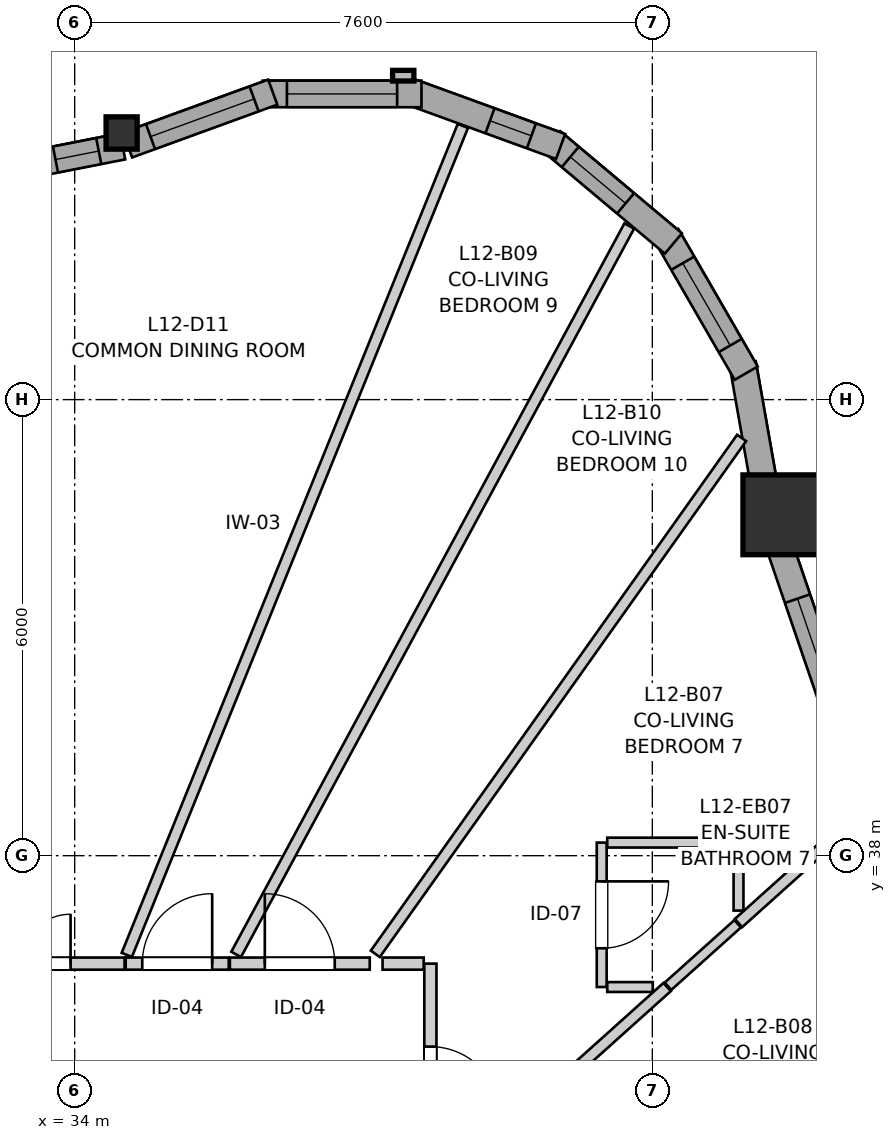
"""IFC4 building model, lengths in metres.
Left out: names, types, materials, properties, quantities, classifications, styles, units other than length and angle.
Written with IfcOpenShell. Run it as: python <this file> out.ifc"""

import sys

from ifc_helpers import new_model, si_unit, direction, frame, frame_2d, origin, origin_2d, place, context, subcontext, project, spatial, rectangle, i_section, extrude, source, transform, mapped, element, fill, save


model = new_model("IFC4")
c1 = context("Model", 3, precision=1e-05, world=origin(), true_north=direction((0.0, 1.0)))
c2 = subcontext(c1, "Body", "Model", "MODEL_VIEW")
j1 = project(units=[si_unit("LENGTHUNIT", "METRE"), si_unit("PLANEANGLEUNIT", "RADIAN")], contexts=[c1])
p1 = place(None, origin())
s1 = spatial("IfcSite", under=j1, at=p1, CompositionType="ELEMENT")
p2 = place(p1, origin())
s2 = spatial("IfcBuilding", under=s1, at=p2, CompositionType="ELEMENT")
p3 = place(p2, frame((0.0, 0.0, 43.0)))
s3 = spatial("IfcBuildingStorey", under=s2, at=p3, CompositionType="ELEMENT", Elevation=43.0)
m1 = source(origin(), c2, "Body", "SweptSolid", [
    extrude(rectangle(XDim=1.05, YDim=1.05, at=origin_2d()), origin(), (0.0, 0.0, 1.0), 2.94),
])
p4 = place(p3, frame((43.317, 42.485, 0.0), z_axis=(0.0, 0.0, 1.0), x_axis=(1.0, 0.0, 0.0)))
e1 = element("IfcColumn", 1, at=p4, inside=s3, PredefinedType="COLUMN", context=c2, shape_type="MappedRepresentation", body=[
    mapped(m1, transform((0.0, 0.0, 0.0), x_axis=(1.0, 0.0, 0.0), y_axis=(0.0, 1.0, 0.0), z_axis=(0.0, 0.0, 1.0), scale=1.0)),
])
m2 = source(origin(), c2, "Body", "SweptSolid", [
    extrude(i_section(OverallWidth=0.409, OverallDepth=0.425, WebThickness=0.03, FlangeThickness=0.048, FilletRadius=0.015, at=origin_2d()), origin(), (0.0, 0.0, 1.0), 2.94),
])
p5 = place(p3, frame((34.617, 47.508, 0.0), z_axis=(0.0, 0.0, 1.0), x_axis=(1.0, 0.0, 0.0)))
e2 = element("IfcColumn", 2, at=p5, inside=s3, PredefinedType="PILASTER", context=c2, shape_type="MappedRepresentation", body=[
    mapped(m2, transform((0.0, 0.0, 0.0), x_axis=(1.0, 0.0, 0.0), y_axis=(0.0, 1.0, 0.0), z_axis=(0.0, 0.0, 1.0), scale=1.0)),
])
p6 = place(p3, frame((44.292, 39.095, 0.0), z_axis=(0.0, 0.0, 1.0), x_axis=(-0.323582370233, 0.946200005112, 0.0)))
e3 = element("IfcWall", 3, at=p6, inside=s3, PredefinedType="SOLIDWALL", context=c2, shape_type="SweptSolid", body=[
    extrude(rectangle(XDim=3.222, YDim=0.35, at=frame_2d((1.611, 0.0))), origin(), (0.0, 0.0, 1.0), 2.42),
])
p7 = place(p6, frame((0.816, 0.0, 0.82)))
e4 = element("IfcOpeningElement", 4, at=p7, cuts=e3, PredefinedType="OPENING", context=c2, shape_type="SweptSolid", body=[
    extrude(rectangle(XDim=1.6, YDim=1.35, at=frame_2d((0.8, 0.675))), frame((0.0, 0.185, 0.0), z_axis=(0.0, -1.0, 0.0), x_axis=(1.0, 0.0, 0.0)), (0.0, 0.0, 1.0), 0.37),
])
p8 = place(p3, frame((43.093, 42.75, 0.0), z_axis=(0.0, 0.0, 1.0), x_axis=(-0.173610462023, 0.984814402553, 0.0)))
e5 = element("IfcWall", 5, at=p8, inside=s3, PredefinedType="SOLIDWALL", context=c2, shape_type="SweptSolid", body=[
    extrude(rectangle(XDim=1.752, YDim=0.35, at=frame_2d((0.876, 0.0))), origin(), (0.0, 0.0, 1.0), 2.42),
])
p9 = place(p3, frame((42.835, 44.348, 0.0), z_axis=(0.0, 0.0, 1.0), x_axis=(-0.499995423472, 0.866028046028, 0.0)))
e6 = element("IfcWall", 6, at=p9, inside=s3, PredefinedType="SOLIDWALL", context=c2, shape_type="SweptSolid", body=[
    extrude(rectangle(XDim=2.09, YDim=0.35, at=frame_2d((1.045, 0.0))), origin(), (0.0, 0.0, 1.0), 2.42),
])
p10 = place(p9, frame((0.42, 0.0, 0.82)))
e7 = element("IfcOpeningElement", 7, at=p10, cuts=e6, PredefinedType="OPENING", context=c2, shape_type="SweptSolid", body=[
    extrude(rectangle(XDim=1.25, YDim=1.35, at=frame_2d((0.625, 0.675))), frame((0.0, 0.185, 0.0), z_axis=(0.0, -1.0, 0.0), x_axis=(1.0, 0.0, 0.0)), (0.0, 0.0, 1.0), 0.37),
])
p11 = place(p3, frame((41.877, 46.054, 0.0), z_axis=(0.0, 0.0, 1.0), x_axis=(-0.766024572719, 0.642811289563, 0.0)))
e8 = element("IfcWall", 8, at=p11, inside=s3, PredefinedType="SOLIDWALL", context=c2, shape_type="SweptSolid", body=[
    extrude(rectangle(XDim=2.09, YDim=0.35, at=frame_2d((1.045, 0.0))), origin(), (0.0, 0.0, 1.0), 2.42),
])
p12 = place(p11, frame((0.821, 0.0, 0.82)))
e9 = element("IfcOpeningElement", 9, at=p12, cuts=e8, PredefinedType="OPENING", context=c2, shape_type="SweptSolid", body=[
    extrude(rectangle(XDim=0.95, YDim=1.35, at=frame_2d((0.475, 0.675))), frame((0.0, 0.185, 0.0), z_axis=(0.0, -1.0, 0.0), x_axis=(1.0, 0.0, 0.0)), (0.0, 0.0, 1.0), 0.37),
])
p13 = place(p3, frame((40.393, 47.33, 0.0), z_axis=(0.0, 0.0, 1.0), x_axis=(-0.939660353162, 0.342108784886, 0.0)))
e10 = element("IfcWall", 10, at=p13, inside=s3, PredefinedType="SOLIDWALL", context=c2, shape_type="SweptSolid", body=[
    extrude(rectangle(XDim=2.09, YDim=0.35, at=frame_2d((1.045, 0.0))), origin(), (0.0, 0.0, 1.0), 2.42),
])
p14 = place(p13, frame((0.409, 0.0, 0.82)))
e11 = element("IfcOpeningElement", 11, at=p14, cuts=e10, PredefinedType="OPENING", context=c2, shape_type="SweptSolid", body=[
    extrude(rectangle(XDim=0.58, YDim=1.35, at=frame_2d((0.29, 0.675))), frame((0.0, 0.185, 0.0), z_axis=(0.0, -1.0, 0.0), x_axis=(1.0, 0.0, 0.0)), (0.0, 0.0, 1.0), 0.37),
])
p15 = place(p3, frame((38.563, 48.022, 0.0), z_axis=(0.0, 0.0, 1.0), x_axis=(-1.0, 0.0, 0.0)))
e12 = element("IfcWall", 12, at=p15, inside=s3, PredefinedType="SOLIDWALL", context=c2, shape_type="SweptSolid", body=[
    extrude(rectangle(XDim=2.09, YDim=0.35, at=frame_2d((1.045, 0.0))), origin(), (0.0, 0.0, 1.0), 2.42),
])
p16 = place(p15, frame((0.32, 0.0, 0.82)))
e13 = element("IfcOpeningElement", 13, at=p16, cuts=e12, PredefinedType="OPENING", context=c2, shape_type="SweptSolid", body=[
    extrude(rectangle(XDim=1.45, YDim=1.25, at=frame_2d((0.725, 0.625))), frame((0.0, 0.185, 0.0), z_axis=(0.0, -1.0, 0.0), x_axis=(1.0, 0.0, 0.0)), (0.0, 0.0, 1.0), 0.37),
])
p17 = place(p3, frame((36.606, 48.045, 0.0), z_axis=(0.0, 0.0, 1.0), x_axis=(-0.939653047052, -0.342128851701, 0.0)))
e14 = element("IfcWall", 14, at=p17, inside=s3, PredefinedType="SOLIDWALL", context=c2, shape_type="SweptSolid", body=[
    extrude(rectangle(XDim=2.032, YDim=0.35, at=frame_2d((1.016, 0.0))), origin(), (0.0, 0.0, 1.0), 2.42),
])
p18 = place(p17, frame((0.261, 0.0, 0.82)))
e15 = element("IfcOpeningElement", 15, at=p18, cuts=e14, PredefinedType="OPENING", context=c2, shape_type="SweptSolid", body=[
    extrude(rectangle(XDim=1.45, YDim=1.25, at=frame_2d((0.725, 0.625))), frame((0.0, 0.185, 0.0), z_axis=(0.0, -1.0, 0.0), x_axis=(1.0, 0.0, 0.0)), (0.0, 0.0, 1.0), 0.37),
])
p19 = place(p3, frame((34.632, 47.332, 0.0), z_axis=(0.0, 0.0, 1.0), x_axis=(-0.981234691866, -0.192817217796, 0.0)))
e16 = element("IfcWall", 16, at=p19, inside=s3, PredefinedType="SOLIDWALL", context=c2, shape_type="SweptSolid", body=[
    extrude(rectangle(XDim=3.502, YDim=0.35, at=frame_2d((1.751, 0.0))), origin(), (0.0, 0.0, 1.0), 2.42),
])
p20 = place(p19, frame((0.321, 0.0, 0.82)))
e17 = element("IfcOpeningElement", 17, at=p20, cuts=e16, PredefinedType="OPENING", context=c2, shape_type="SweptSolid", body=[
    extrude(rectangle(XDim=0.58, YDim=1.35, at=frame_2d((0.29, 0.675))), frame((0.0, 0.185, 0.0), z_axis=(0.0, -1.0, 0.0), x_axis=(1.0, 0.0, 0.0)), (0.0, 0.0, 1.0), 0.37),
])
p21 = place(p19, frame((1.567, 0.0, 0.82)))
e18 = element("IfcOpeningElement", 18, at=p21, cuts=e16, PredefinedType="OPENING", context=c2, shape_type="SweptSolid", body=[
    extrude(rectangle(XDim=1.45, YDim=1.25, at=frame_2d((0.725, 0.625))), frame((0.0, 0.185, 0.0), z_axis=(0.0, -1.0, 0.0), x_axis=(1.0, 0.0, 0.0)), (0.0, 0.0, 1.0), 0.37),
])
p22 = place(p3, frame((38.68, 36.58, 0.0), z_axis=(0.0, 0.0, 1.0), x_axis=(0.0, -1.0, 0.0)))
e19 = element("IfcWall", 19, at=p22, inside=s3, PredefinedType="PARTITIONING", context=c2, shape_type="SweptSolid", body=[
    extrude(rectangle(XDim=3.069, YDim=0.16, at=frame_2d((1.535, 0.0))), origin(), (0.0, 0.0, 1.0), 2.94),
])
p23 = place(p22, frame((1.092, 0.0, 0.0)))
e20 = element("IfcOpeningElement", 20, at=p23, cuts=e19, PredefinedType="OPENING", context=c2, shape_type="SweptSolid", body=[
    extrude(rectangle(XDim=0.92, YDim=2.1, at=frame_2d((0.46, 1.05))), frame((0.0, 0.09, 0.0), z_axis=(0.0, -1.0, 0.0), x_axis=(1.0, 0.0, 0.0)), (0.0, 0.0, 1.0), 0.18),
])
p24 = place(p3, frame((31.938, 36.58, 0.0), z_axis=(0.0, 0.0, 1.0), x_axis=(1.0, 0.0, 0.0)))
e21 = element("IfcWall", 21, at=p24, inside=s3, PredefinedType="PARTITIONING", context=c2, shape_type="SweptSolid", body=[
    extrude(rectangle(XDim=2.718, YDim=0.16, at=frame_2d((1.359, 0.0))), origin(), (0.0, 0.0, 1.0), 2.94),
])
p25 = place(p24, frame((0.708, 0.0, 0.0)))
e22 = element("IfcOpeningElement", 22, at=p25, cuts=e21, PredefinedType="OPENING", context=c2, shape_type="SweptSolid", body=[
    extrude(rectangle(XDim=1.3, YDim=2.1, at=frame_2d((0.65, 1.05))), frame((0.0, 0.09, 0.0), z_axis=(0.0, -1.0, 0.0), x_axis=(1.0, 0.0, 0.0)), (0.0, 0.0, 1.0), 0.18),
])
p26 = place(p3, frame((40.934, 38.172, 0.0), z_axis=(0.0, 0.0, 1.0), x_axis=(0.0, -1.0, 0.0)))
e23 = element("IfcWall", 23, at=p26, inside=s3, PredefinedType="PARTITIONING", context=c2, shape_type="SweptSolid", body=[
    extrude(rectangle(XDim=1.9, YDim=0.13, at=frame_2d((0.95, 0.0))), origin(), (0.0, 0.0, 1.0), 2.94),
])
p27 = place(p26, frame((0.51, 0.0, 0.0)))
e24 = element("IfcOpeningElement", 24, at=p27, cuts=e23, PredefinedType="OPENING", context=c2, shape_type="SweptSolid", body=[
    extrude(rectangle(XDim=0.88, YDim=2.05, at=frame_2d((0.44, 1.025))), frame((0.0, 0.075, 0.0), z_axis=(0.0, -1.0, 0.0), x_axis=(1.0, 0.0, 0.0)), (0.0, 0.0, 1.0), 0.15),
])
p28 = place(p3, frame((36.042, 36.58, 0.0), z_axis=(0.0, 0.0, 1.0), x_axis=(1.0, 0.0, 0.0)))
e25 = element("IfcWall", 25, at=p28, inside=s3, PredefinedType="PARTITIONING", context=c2, shape_type="SweptSolid", body=[
    extrude(rectangle(XDim=1.84, YDim=0.16, at=frame_2d((0.92, 0.0))), origin(), (0.0, 0.0, 1.0), 2.94),
])
p29 = place(p28, frame((0.459, 0.0, 0.0)))
e26 = element("IfcOpeningElement", 26, at=p29, cuts=e25, PredefinedType="OPENING", context=c2, shape_type="SweptSolid", body=[
    extrude(rectangle(XDim=0.92, YDim=2.1, at=frame_2d((0.46, 1.05))), frame((0.0, 0.09, 0.0), z_axis=(0.0, -1.0, 0.0), x_axis=(1.0, 0.0, 0.0)), (0.0, 0.0, 1.0), 0.18),
])
p30 = place(p3, frame((34.671, 36.58, 0.0), z_axis=(0.0, 0.0, 1.0), x_axis=(1.0, 0.0, 0.0)))
e27 = element("IfcWall", 27, at=p30, inside=s3, PredefinedType="PARTITIONING", context=c2, shape_type="SweptSolid", body=[
    extrude(rectangle(XDim=1.356, YDim=0.16, at=frame_2d((0.678, 0.0))), origin(), (0.0, 0.0, 1.0), 2.94),
])
p31 = place(p30, frame((0.218, 0.0, 0.0)))
e28 = element("IfcOpeningElement", 28, at=p31, cuts=e27, PredefinedType="OPENING", context=c2, shape_type="SweptSolid", body=[
    extrude(rectangle(XDim=0.92, YDim=2.1, at=frame_2d((0.46, 1.05))), frame((0.0, 0.09, 0.0), z_axis=(0.0, -1.0, 0.0), x_axis=(1.0, 0.0, 0.0)), (0.0, 0.0, 1.0), 0.18),
])
p32 = place(p3, frame((34.686, 36.695, 0.0), z_axis=(0.0, 0.0, 1.0), x_axis=(0.375735926904, 0.926726773776, 0.0)))
e29 = element("IfcWall", 29, at=p32, inside=s3, PredefinedType="PARTITIONING", context=c2, shape_type="SweptSolid", body=[
    extrude(rectangle(XDim=11.769, YDim=0.145, at=frame_2d((5.884, 0.0))), origin(), (0.0, 0.0, 1.0), 2.94),
])
p33 = place(p3, frame((36.125, 36.701, 0.0), z_axis=(0.0, 0.0, 1.0), x_axis=(0.474948586069, 0.880013545686, 0.0)))
e30 = element("IfcWall", 30, at=p33, inside=s3, PredefinedType="PARTITIONING", context=c2, shape_type="SweptSolid", body=[
    extrude(rectangle(XDim=10.889, YDim=0.145, at=frame_2d((5.445, 0.0))), origin(), (0.0, 0.0, 1.0), 2.94),
])
p34 = place(p3, frame((37.955, 36.708, 0.0), z_axis=(0.0, 0.0, 1.0), x_axis=(0.578991718582, 0.81533342248, 0.0)))
e31 = element("IfcWall", 31, at=p34, inside=s3, PredefinedType="PARTITIONING", context=c2, shape_type="SweptSolid", body=[
    extrude(rectangle(XDim=8.325, YDim=0.145, at=frame_2d((4.163, 0.0))), origin(), (0.0, 0.0, 1.0), 2.94),
])
p35 = place(p3, frame((38.814, 33.597, 0.0), z_axis=(0.0, 0.0, 1.0), x_axis=(0.74417856937, 0.667980730927, 0.0)))
e32 = element("IfcWall", 32, at=p35, inside=s3, PredefinedType="PARTITIONING", context=c2, shape_type="SweptSolid", body=[
    extrude(rectangle(XDim=4.005, YDim=0.145, at=frame_2d((2.002, 0.0))), origin(), (0.0, 0.0, 1.0), 2.94),
])
p36 = place(p3, frame((42.734, 37.114, 0.0), z_axis=(0.0, 0.0, 1.0), x_axis=(0.743962922365, 0.668220899214, 0.0)))
e33 = element("IfcWall", 33, at=p36, inside=s3, PredefinedType="PARTITIONING", context=c2, shape_type="SweptSolid", body=[
    extrude(rectangle(XDim=2.05, YDim=0.145, at=frame_2d((1.025, 0.0))), origin(), (0.0, 0.0, 1.0), 2.94),
])
p37 = place(p3, frame((41.007, 38.172, 0.0), z_axis=(0.0, 0.0, 1.0), x_axis=(1.0, 0.0, 0.0)))
e34 = element("IfcWall", 34, at=p37, inside=s3, PredefinedType="PARTITIONING", context=c2, shape_type="SweptSolid", body=[
    extrude(rectangle(XDim=1.727, YDim=0.13, at=frame_2d((0.863, 0.0))), origin(), (0.0, 0.0, 1.0), 2.94),
])
p38 = place(p3, frame((41.806, 36.282, 0.0), z_axis=(0.0, 0.0, 1.0), x_axis=(0.744525261569, 0.667594289135, 0.0)))
e35 = element("IfcWall", 35, at=p38, inside=s3, PredefinedType="PARTITIONING", context=c2, shape_type="SweptSolid", body=[
    extrude(rectangle(XDim=1.231, YDim=0.13, at=frame_2d((0.616, 0.0))), origin(), (0.0, 0.0, 1.0), 2.94),
])
p39 = place(p3, frame((42.734, 37.278, 0.0), z_axis=(0.0, 0.0, 1.0), x_axis=(0.0, 1.0, 0.0)))
e36 = element("IfcWall", 36, at=p39, inside=s3, PredefinedType="PARTITIONING", context=c2, shape_type="SweptSolid", body=[
    extrude(rectangle(XDim=0.821, YDim=0.13, at=frame_2d((0.411, 0.0))), origin(), (0.0, 0.0, 1.0), 2.94),
])
p40 = place(p3, frame((41.007, 36.272, 0.0), z_axis=(0.0, 0.0, 1.0), x_axis=(1.0, 0.0, 0.0)))
e37 = element("IfcWall", 37, at=p40, inside=s3, PredefinedType="PARTITIONING", context=c2, shape_type="SweptSolid", body=[
    extrude(rectangle(XDim=0.599, YDim=0.13, at=frame_2d((0.299, 0.0))), origin(), (0.0, 0.0, 1.0), 2.94),
])
p41 = place(p3, frame((38.051, 36.58, 0.0), z_axis=(0.0, 0.0, 1.0), x_axis=(1.0, 0.0, 0.0)))
e38 = element("IfcWall", 38, at=p41, inside=s3, PredefinedType="PARTITIONING", context=c2, shape_type="SweptSolid", body=[
    extrude(rectangle(XDim=0.541, YDim=0.16, at=frame_2d((0.271, 0.0))), origin(), (0.0, 0.0, 1.0), 2.94),
])
m3 = source(origin(), c2, "Body", "SweptSolid", [
    extrude(rectangle(XDim=1.6, YDim=1.35, at=frame_2d((0.8, 0.675))), frame((0.0, 0.03, 0.0), z_axis=(0.0, -1.0, 0.0), x_axis=(1.0, 0.0, 0.0)), (0.0, 0.0, 1.0), 0.06),
])
p42 = place(p7, origin())
e39 = element("IfcWindow", 39, at=p42, inside=s3, PartitioningType="SINGLE_PANEL", PredefinedType="WINDOW", context=c2, shape_type="MappedRepresentation", body=[
    mapped(m3, transform((0.0, 0.0, 0.0), x_axis=(1.0, 0.0, 0.0), y_axis=(0.0, 1.0, 0.0), z_axis=(0.0, 0.0, 1.0), scale=1.0)),
])
fill(e4, e39)
m4 = source(origin(), c2, "Body", "SweptSolid", [
    extrude(rectangle(XDim=1.25, YDim=1.35, at=frame_2d((0.625, 0.675))), frame((0.0, 0.03, 0.0), z_axis=(0.0, -1.0, 0.0), x_axis=(1.0, 0.0, 0.0)), (0.0, 0.0, 1.0), 0.06),
])
p43 = place(p10, origin())
e40 = element("IfcWindow", 40, at=p43, inside=s3, PartitioningType="SINGLE_PANEL", PredefinedType="WINDOW", context=c2, shape_type="MappedRepresentation", body=[
    mapped(m4, transform((0.0, 0.0, 0.0), x_axis=(1.0, 0.0, 0.0), y_axis=(0.0, 1.0, 0.0), z_axis=(0.0, 0.0, 1.0), scale=1.0)),
])
fill(e7, e40)
m5 = source(origin(), c2, "Body", "SweptSolid", [
    extrude(rectangle(XDim=0.95, YDim=1.35, at=frame_2d((0.475, 0.675))), frame((0.0, 0.03, 0.0), z_axis=(0.0, -1.0, 0.0), x_axis=(1.0, 0.0, 0.0)), (0.0, 0.0, 1.0), 0.06),
])
p44 = place(p12, origin())
e41 = element("IfcWindow", 41, at=p44, inside=s3, PartitioningType="SINGLE_PANEL", PredefinedType="WINDOW", context=c2, shape_type="MappedRepresentation", body=[
    mapped(m5, transform((0.0, 0.0, 0.0), x_axis=(1.0, 0.0, 0.0), y_axis=(0.0, 1.0, 0.0), z_axis=(0.0, 0.0, 1.0), scale=1.0)),
])
fill(e9, e41)
m6 = source(origin(), c2, "Body", "SweptSolid", [
    extrude(rectangle(XDim=0.58, YDim=1.35, at=frame_2d((0.29, 0.675))), frame((0.0, 0.03, 0.0), z_axis=(0.0, -1.0, 0.0), x_axis=(1.0, 0.0, 0.0)), (0.0, 0.0, 1.0), 0.06),
])
p45 = place(p14, origin())
e42 = element("IfcWindow", 42, at=p45, inside=s3, PartitioningType="SINGLE_PANEL", PredefinedType="WINDOW", context=c2, shape_type="MappedRepresentation", body=[
    mapped(m6, transform((0.0, 0.0, 0.0), x_axis=(1.0, 0.0, 0.0), y_axis=(0.0, 1.0, 0.0), z_axis=(0.0, 0.0, 1.0), scale=1.0)),
])
fill(e11, e42)
m7 = source(origin(), c2, "Body", "SweptSolid", [
    extrude(rectangle(XDim=1.45, YDim=1.25, at=frame_2d((0.725, 0.625))), frame((0.0, 0.03, 0.0), z_axis=(0.0, -1.0, 0.0), x_axis=(1.0, 0.0, 0.0)), (0.0, 0.0, 1.0), 0.06),
])
p46 = place(p16, origin())
e43 = element("IfcWindow", 43, at=p46, inside=s3, PartitioningType="SINGLE_PANEL", PredefinedType="WINDOW", context=c2, shape_type="MappedRepresentation", body=[
    mapped(m7, transform((0.0, 0.0, 0.0), x_axis=(1.0, 0.0, 0.0), y_axis=(0.0, 1.0, 0.0), z_axis=(0.0, 0.0, 1.0), scale=1.0)),
])
fill(e13, e43)
p47 = place(p18, origin())
e44 = element("IfcWindow", 44, at=p47, inside=s3, PartitioningType="SINGLE_PANEL", PredefinedType="WINDOW", context=c2, shape_type="MappedRepresentation", body=[
    mapped(m7, transform((0.0, 0.0, 0.0), x_axis=(1.0, 0.0, 0.0), y_axis=(0.0, 1.0, 0.0), z_axis=(0.0, 0.0, 1.0), scale=1.0)),
])
fill(e15, e44)
p48 = place(p20, origin())
e45 = element("IfcWindow", 45, at=p48, inside=s3, PartitioningType="SINGLE_PANEL", PredefinedType="WINDOW", context=c2, shape_type="MappedRepresentation", body=[
    mapped(m6, transform((0.0, 0.0, 0.0), x_axis=(1.0, 0.0, 0.0), y_axis=(0.0, 1.0, 0.0), z_axis=(0.0, 0.0, 1.0), scale=1.0)),
])
fill(e17, e45)
m8 = source(origin(), c2, "Body", "SweptSolid", [
    extrude(rectangle(XDim=0.92, YDim=2.1, at=frame_2d((0.46, 1.05))), frame((0.0, 0.025, 0.0), z_axis=(0.0, -1.0, 0.0), x_axis=(1.0, 0.0, 0.0)), (0.0, 0.0, 1.0), 0.05),
])
p49 = place(p23, origin())
e46 = element("IfcDoor", 46, at=p49, inside=s3, OperationType="SINGLE_SWING_RIGHT", PredefinedType="DOOR", context=c2, shape_type="MappedRepresentation", body=[
    mapped(m8, transform((0.0, 0.0, 0.0), x_axis=(1.0, 0.0, 0.0), y_axis=(0.0, 1.0, 0.0), z_axis=(0.0, 0.0, 1.0), scale=1.0)),
])
fill(e20, e46)
m9 = source(origin(), c2, "Body", "SweptSolid", [
    extrude(rectangle(XDim=1.3, YDim=2.1, at=frame_2d((0.65, 1.05))), frame((0.0, 0.025, 0.0), z_axis=(0.0, -1.0, 0.0), x_axis=(1.0, 0.0, 0.0)), (0.0, 0.0, 1.0), 0.05),
])
p50 = place(p25, origin())
e47 = element("IfcDoor", 47, at=p50, inside=s3, OperationType="DOUBLE_DOOR_SINGLE_SWING", PredefinedType="DOOR", context=c2, shape_type="MappedRepresentation", body=[
    mapped(m9, transform((0.0, 0.0, 0.0), x_axis=(1.0, 0.0, 0.0), y_axis=(0.0, 1.0, 0.0), z_axis=(0.0, 0.0, 1.0), scale=1.0)),
])
fill(e22, e47)
m10 = source(origin(), c2, "Body", "SweptSolid", [
    extrude(rectangle(XDim=0.88, YDim=2.05, at=frame_2d((0.44, 1.025))), frame((0.0, 0.025, 0.0), z_axis=(0.0, -1.0, 0.0), x_axis=(1.0, 0.0, 0.0)), (0.0, 0.0, 1.0), 0.05),
])
p51 = place(p27, origin())
e48 = element("IfcDoor", 48, at=p51, inside=s3, OperationType="SINGLE_SWING_LEFT", PredefinedType="DOOR", context=c2, shape_type="MappedRepresentation", body=[
    mapped(m10, transform((0.0, 0.0, 0.0), x_axis=(1.0, 0.0, 0.0), y_axis=(0.0, 1.0, 0.0), z_axis=(0.0, 0.0, 1.0), scale=1.0)),
])
fill(e24, e48)
p52 = place(p29, origin())
e49 = element("IfcDoor", 49, at=p52, inside=s3, OperationType="SINGLE_SWING_LEFT", PredefinedType="DOOR", context=c2, shape_type="MappedRepresentation", body=[
    mapped(m8, transform((0.0, 0.0, 0.0), x_axis=(1.0, 0.0, 0.0), y_axis=(0.0, 1.0, 0.0), z_axis=(0.0, 0.0, 1.0), scale=1.0)),
])
fill(e26, e49)
p53 = place(p31, origin())
e50 = element("IfcDoor", 50, at=p53, inside=s3, OperationType="SINGLE_SWING_RIGHT", PredefinedType="DOOR", context=c2, shape_type="MappedRepresentation", body=[
    mapped(m8, transform((0.0, 0.0, 0.0), x_axis=(1.0, 0.0, 0.0), y_axis=(0.0, 1.0, 0.0), z_axis=(0.0, 0.0, 1.0), scale=1.0)),
])
fill(e28, e50)
save(model, sys.argv[1])
